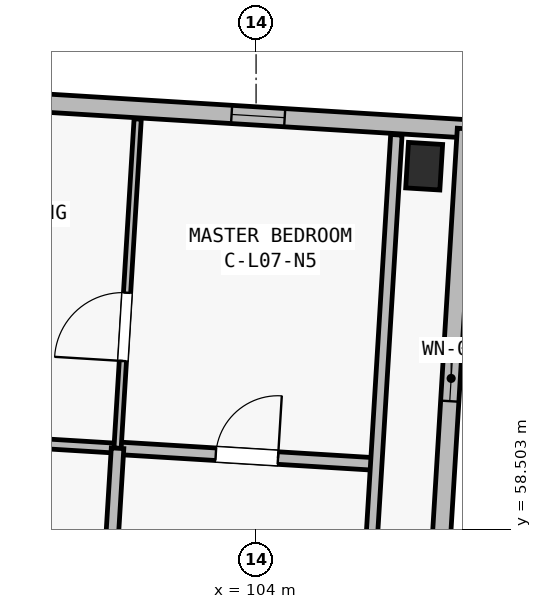
"""IFC4 building model, lengths in metres.
Left out: names, types, materials, properties, quantities, classifications, styles, units other than length and angle.
Written with IfcOpenShell. Run it as: python <this file> out.ifc"""

import sys

from ifc_helpers import new_model, si_unit, direction, frame, frame_2d, origin, origin_2d, place, context, subcontext, project, spatial, polyline, rectangle, outline, extrude, element, fill, save


model = new_model("IFC4")
c1 = context("Model", 3, precision=1e-05, world=origin(), true_north=direction((0.0, 1.0)))
c2 = subcontext(c1, "Body", "Model", "MODEL_VIEW")
j1 = project(units=[si_unit("LENGTHUNIT", "METRE"), si_unit("PLANEANGLEUNIT", "RADIAN")], contexts=[c1])
p1 = place(None, origin())
s1 = spatial("IfcSite", under=j1, at=p1, CompositionType="ELEMENT")
p2 = place(p1, origin())
s2 = spatial("IfcBuilding", under=s1, at=p2, CompositionType="ELEMENT")
p3 = place(p2, frame((0.0, 0.0, 24.65)))
s3 = spatial("IfcBuildingStorey", under=s2, at=p3, CompositionType="ELEMENT", Elevation=24.65)
p4 = place(p3, frame((106.211, 63.28, 0.0), z_axis=(0.0, 0.0, 1.0), x_axis=(0.998134798422, -0.061048539535, 0.0)))
e1 = element("IfcColumn", 1, at=p4, inside=s3, PredefinedType="COLUMN", context=c2, shape_type="SweptSolid", body=[
    extrude(rectangle(XDim=0.45, YDim=0.6, at=origin_2d()), origin(), (0.0, 0.0, 1.0), 4.701),
])
p5 = place(p3, frame((99.182, 64.236, 0.0), z_axis=(0.0, 0.0, 1.0), x_axis=(0.998133711765, -0.06106630362, 0.0)))
e2 = element("IfcWall", 2, at=p5, inside=s3, PredefinedType="SOLIDWALL", context=c2, shape_type="SweptSolid", body=[
    extrude(outline(polyline([(0.0, 0.0), (7.6, 0.0), (7.6, 5.085), (0.0, 6.548), (0.0, 0.0)])), frame((0.0, 0.12, 0.0), z_axis=(0.0, -1.0, 0.0), x_axis=(1.0, 0.0, 0.0)), (0.0, 0.0, 1.0), 0.24),
])
p6 = place(p5, frame((1.376, 0.0, 0.44)))
e3 = element("IfcOpeningElement", 3, at=p6, cuts=e2, PredefinedType="OPENING", context=c2, shape_type="SweptSolid", body=[
    extrude(rectangle(XDim=0.62, YDim=2.28, at=frame_2d((0.31, 1.14))), frame((0.0, 0.135, 0.0), z_axis=(0.0, -1.0, 0.0), x_axis=(1.0, 0.0, 0.0)), (0.0, 0.0, 1.0), 0.27),
])
p7 = place(p5, frame((4.505, 0.0, 0.5)))
e4 = element("IfcOpeningElement", 4, at=p7, cuts=e2, PredefinedType="OPENING", context=c2, shape_type="SweptSolid", body=[
    extrude(rectangle(XDim=0.7, YDim=2.36, at=frame_2d((0.35, 1.18))), frame((0.0, 0.135, 0.0), z_axis=(0.0, -1.0, 0.0), x_axis=(1.0, 0.0, 0.0)), (0.0, 0.0, 1.0), 0.27),
])
p8 = place(p3, frame((106.768, 63.771, 0.0), z_axis=(0.0, 0.0, 1.0), x_axis=(-0.061053332998, -0.99813450523, 0.0)))
e5 = element("IfcWall", 5, at=p8, inside=s3, PredefinedType="SOLIDWALL", context=c2, shape_type="SweptSolid", body=[
    extrude(rectangle(XDim=20.65, YDim=0.24, at=frame_2d((10.325, 0.0))), origin(), (0.0, 0.0, 1.0), 5.085),
])
p9 = place(p8, frame((2.99, 0.0, 0.52)))
e6 = element("IfcOpeningElement", 6, at=p9, cuts=e5, PredefinedType="OPENING", context=c2, shape_type="SweptSolid", body=[
    extrude(rectangle(XDim=0.6, YDim=2.22, at=frame_2d((0.3, 1.11))), frame((0.0, 0.135, 0.0), z_axis=(0.0, -1.0, 0.0), x_axis=(1.0, 0.0, 0.0)), (0.0, 0.0, 1.0), 0.27),
])
p10 = place(p8, frame((17.28, 0.0, 0.45)))
e7 = element("IfcOpeningElement", 7, at=p10, cuts=e5, PredefinedType="OPENING", context=c2, shape_type="SweptSolid", body=[
    extrude(rectangle(XDim=0.74, YDim=2.26, at=frame_2d((0.37, 1.13))), frame((0.0, 0.135, 0.0), z_axis=(0.0, -1.0, 0.0), x_axis=(1.0, 0.0, 0.0)), (0.0, 0.0, 1.0), 0.27),
])
p11 = place(p3, frame((98.774, 59.777, 0.0), z_axis=(0.0, 0.0, 1.0), x_axis=(0.998137711988, -0.061000884486, 0.0)))
e8 = element("IfcWall", 8, at=p11, inside=s3, PredefinedType="PARTITIONING", context=c2, shape_type="SweptSolid", body=[
    extrude(rectangle(XDim=3.41, YDim=0.13, at=frame_2d((1.705, 0.0))), origin(), (0.0, 0.0, 1.0), 2.97),
])
p12 = place(p11, frame((1.255, 0.0, 0.0)))
e9 = element("IfcOpeningElement", 9, at=p12, cuts=e8, PredefinedType="OPENING", context=c2, shape_type="SweptSolid", body=[
    extrude(rectangle(XDim=0.88, YDim=2.1, at=frame_2d((0.44, 1.05))), frame((0.0, 0.08, 0.0), z_axis=(0.0, -1.0, 0.0), x_axis=(1.0, 0.0, 0.0)), (0.0, 0.0, 1.0), 0.16),
])
p13 = place(p3, frame((102.177, 59.569, 0.0), z_axis=(0.0, 0.0, 1.0), x_axis=(0.998133350094, -0.061072214879, 0.0)))
e10 = element("IfcWall", 10, at=p13, inside=s3, PredefinedType="PLUMBINGWALL", context=c2, shape_type="SweptSolid", body=[
    extrude(rectangle(XDim=3.41, YDim=0.165, at=frame_2d((1.705, 0.0))), origin(), (0.0, 0.0, 1.0), 2.97),
])
p14 = place(p13, frame((1.295, 0.0, 0.0)))
e11 = element("IfcOpeningElement", 11, at=p14, cuts=e10, PredefinedType="OPENING", context=c2, shape_type="SweptSolid", body=[
    extrude(rectangle(XDim=0.82, YDim=2.08, at=frame_2d((0.41, 1.04))), frame((0.0, 0.097, 0.0), z_axis=(0.0, -1.0, 0.0), x_axis=(1.0, 0.0, 0.0)), (0.0, 0.0, 1.0), 0.195),
])
p15 = place(p3, frame((102.177, 59.569, 0.0), z_axis=(0.0, 0.0, 1.0), x_axis=(0.061036861365, 0.998135512621, 0.0)))
e12 = element("IfcWall", 12, at=p15, inside=s3, PredefinedType="PARTITIONING", context=c2, shape_type="SweptSolid", body=[
    extrude(rectangle(XDim=4.34, YDim=0.095, at=frame_2d((2.17, 0.0))), origin(), (0.0, 0.0, 1.0), 2.97),
])
p16 = place(p15, frame((1.15, 0.0, 0.0)))
e13 = element("IfcOpeningElement", 13, at=p16, cuts=e12, PredefinedType="OPENING", context=c2, shape_type="SweptSolid", body=[
    extrude(rectangle(XDim=0.9, YDim=2.1, at=frame_2d((0.45, 1.05))), frame((0.0, 0.062, 0.0), z_axis=(0.0, -1.0, 0.0), x_axis=(1.0, 0.0, 0.0)), (0.0, 0.0, 1.0), 0.125),
])
p17 = place(p3, frame((101.84, 54.049, 0.0), z_axis=(0.0, 0.0, 1.0), x_axis=(0.061056206715, 0.998134329447, 0.0)))
e14 = element("IfcWall", 14, at=p17, inside=s3, PredefinedType="PLUMBINGWALL", context=c2, shape_type="SweptSolid", body=[
    extrude(rectangle(XDim=5.53, YDim=0.165, at=frame_2d((2.765, 0.0))), origin(), (0.0, 0.0, 1.0), 2.97),
])
p18 = place(p3, frame((105.243, 53.841, 0.0), z_axis=(0.0, 0.0, 1.0), x_axis=(0.061047700465, 0.998134849741, 0.0)))
e15 = element("IfcWall", 15, at=p18, inside=s3, PredefinedType="PARTITIONING", context=c2, shape_type="SweptSolid", body=[
    extrude(rectangle(XDim=9.87, YDim=0.15, at=frame_2d((4.935, 0.0))), origin(), (0.0, 0.0, 1.0), 2.97),
])
p19 = place(p7, origin())
e16 = element("IfcWindow", 16, at=p19, inside=s3, PartitioningType="SINGLE_PANEL", PredefinedType="WINDOW", context=c2, shape_type="SweptSolid", body=[
    extrude(rectangle(XDim=0.7, YDim=2.36, at=frame_2d((0.35, 1.18))), frame((0.0, 0.03, 0.0), z_axis=(0.0, -1.0, 0.0), x_axis=(1.0, 0.0, 0.0)), (0.0, 0.0, 1.0), 0.06),
])
fill(e4, e16)
p20 = place(p9, origin())
e17 = element("IfcWindow", 17, at=p20, inside=s3, PartitioningType="SINGLE_PANEL", PredefinedType="WINDOW", context=c2, shape_type="SweptSolid", body=[
    extrude(rectangle(XDim=0.6, YDim=2.22, at=frame_2d((0.3, 1.11))), frame((0.0, 0.03, 0.0), z_axis=(0.0, -1.0, 0.0), x_axis=(1.0, 0.0, 0.0)), (0.0, 0.0, 1.0), 0.06),
])
fill(e6, e17)
p21 = place(p14, origin())
e18 = element("IfcDoor", 18, at=p21, inside=s3, OperationType="SINGLE_SWING_RIGHT", PredefinedType="DOOR", context=c2, shape_type="SweptSolid", body=[
    extrude(rectangle(XDim=0.82, YDim=2.08, at=frame_2d((0.41, 1.04))), frame((0.0, 0.025, 0.0), z_axis=(0.0, -1.0, 0.0), x_axis=(1.0, 0.0, 0.0)), (0.0, 0.0, 1.0), 0.05),
])
fill(e11, e18)
p22 = place(p16, origin())
e19 = element("IfcDoor", 19, at=p22, inside=s3, OperationType="SINGLE_SWING_LEFT", PredefinedType="DOOR", context=c2, shape_type="SweptSolid", body=[
    extrude(rectangle(XDim=0.9, YDim=2.1, at=frame_2d((0.45, 1.05))), frame((0.0, 0.025, 0.0), z_axis=(0.0, -1.0, 0.0), x_axis=(1.0, 0.0, 0.0)), (0.0, 0.0, 1.0), 0.05),
])
fill(e13, e19)
save(model, sys.argv[1])
